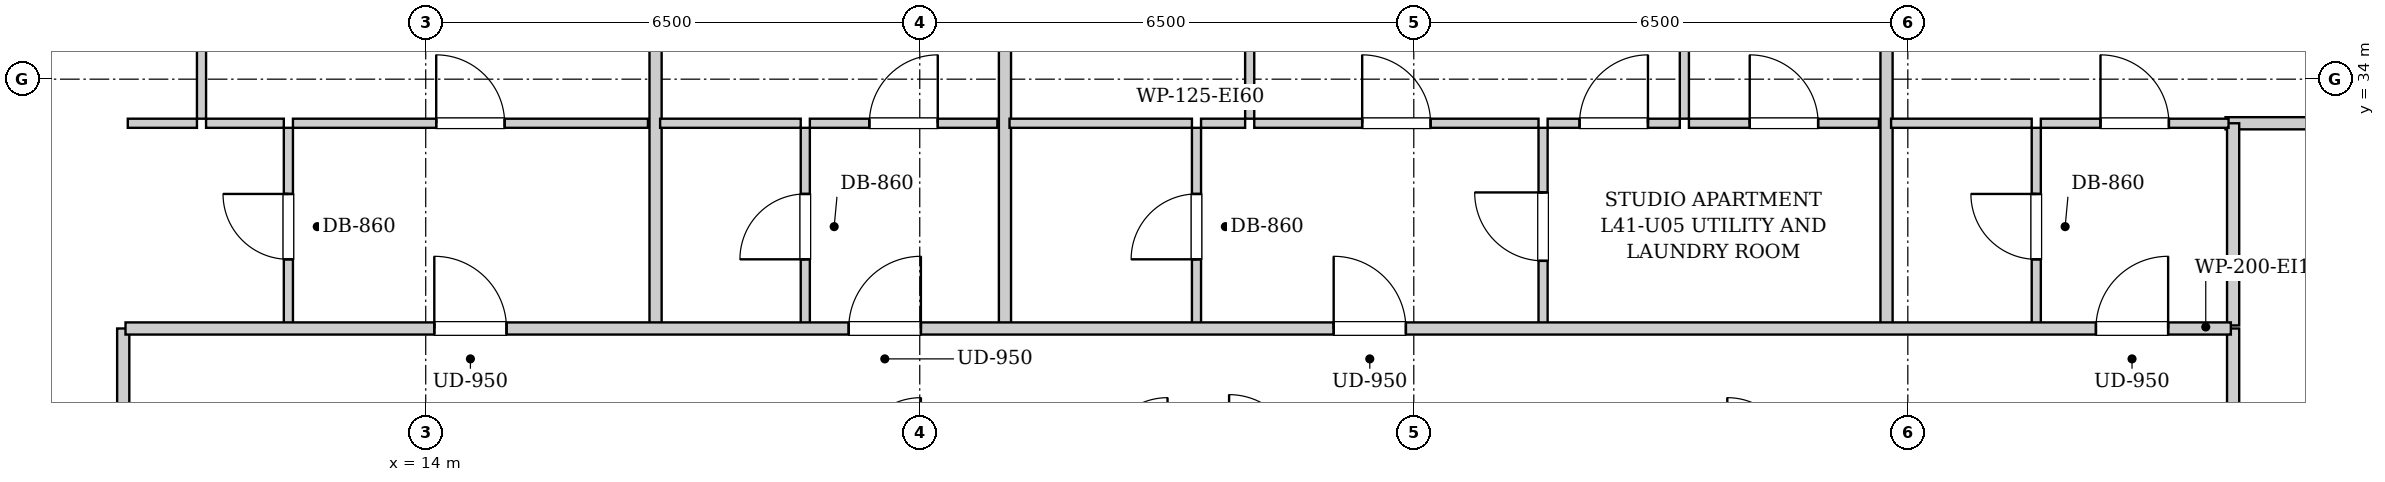
"""IFC4 building model, lengths in metres.
Left out: names, types, materials, properties, quantities, classifications, styles, units other than length and angle.
Written with IfcOpenShell. Run it as: python <this file> out.ifc"""

import sys

from ifc_helpers import new_model, si_unit, direction, frame, frame_2d, origin, place, context, subcontext, project, spatial, rectangle, extrude, element, fill, save


model = new_model("IFC4")
c1 = context("Model", 3, precision=1e-05, world=origin(), true_north=direction((0.0, 1.0)))
c2 = subcontext(c1, "Body", "Model", "MODEL_VIEW")
j1 = project(units=[si_unit("LENGTHUNIT", "METRE"), si_unit("PLANEANGLEUNIT", "RADIAN")], contexts=[c1])
p1 = place(None, origin())
s1 = spatial("IfcSite", under=j1, at=p1, CompositionType="ELEMENT")
p2 = place(p1, origin())
s2 = spatial("IfcBuilding", under=s1, at=p2, CompositionType="ELEMENT")
p3 = place(p2, frame((0.0, 0.0, 143.9)))
s3 = spatial("IfcBuildingStorey", under=s2, at=p3, CompositionType="ELEMENT", Elevation=143.9)
for number, where, z_axis, x_axis in (
    (1, (10.02, 28.98, 0.0), (0.0, 0.0, 1.0), (0.0, 1.0, 0.0)),
    (2, (37.78, 28.98, 0.0), (0.0, 0.0, 1.0), (0.0, 1.0, 0.0)),
):
    element("IfcWall", number, at=place(p3, frame(where, z_axis=z_axis, x_axis=x_axis)), inside=s3, PredefinedType="PARTITIONING", context=c2, shape_type="SweptSolid", body=[
        extrude(rectangle(XDim=1.74, YDim=0.16, at=frame_2d((0.87, 0.0))), origin(), (0.0, 0.0, 1.0), 2.99),
    ])
p4 = place(p3, frame((12.193, 30.76, 0.0), z_axis=(0.0, 0.0, 1.0), x_axis=(0.0, 1.0, 0.0)))
e3 = element("IfcWall", 3, at=p4, inside=s3, PredefinedType="PARTITIONING", context=c2, shape_type="SweptSolid", body=[
    extrude(rectangle(XDim=2.6, YDim=0.12, at=frame_2d((1.3, 0.0))), origin(), (0.0, 0.0, 1.0), 2.99),
])
p5 = place(p4, frame((0.87, 0.0, 0.0)))
e4 = element("IfcOpeningElement", 4, at=p5, cuts=e3, PredefinedType="OPENING", context=c2, shape_type="SweptSolid", body=[
    extrude(rectangle(XDim=0.86, YDim=2.05, at=frame_2d((0.43, 1.025))), frame((0.0, 0.07, 0.0), z_axis=(0.0, -1.0, 0.0), x_axis=(1.0, 0.0, 0.0)), (0.0, 0.0, 1.0), 0.14),
])
p6 = place(p3, frame((10.08, 33.42, 0.0), z_axis=(0.0, 0.0, 1.0), x_axis=(1.0, 0.0, 0.0)))
e5 = element("IfcWall", 5, at=p6, inside=s3, PredefinedType="PARTITIONING", context=c2, shape_type="SweptSolid", body=[
    extrude(rectangle(XDim=0.91, YDim=0.12, at=frame_2d((0.455, 0.0))), origin(), (0.0, 0.0, 1.0), 2.99),
])
p7 = place(p3, frame((11.11, 33.42, 0.0), z_axis=(0.0, 0.0, 1.0), x_axis=(1.0, 0.0, 0.0)))
e6 = element("IfcWall", 6, at=p7, inside=s3, PredefinedType="PARTITIONING", context=c2, shape_type="SweptSolid", body=[
    extrude(rectangle(XDim=1.023, YDim=0.12, at=frame_2d((0.511, 0.0))), origin(), (0.0, 0.0, 1.0), 2.99),
])
p8 = place(p3, frame((12.253, 33.42, 0.0), z_axis=(0.0, 0.0, 1.0), x_axis=(1.0, 0.0, 0.0)))
e7 = element("IfcWall", 7, at=p8, inside=s3, PredefinedType="PARTITIONING", context=c2, shape_type="SweptSolid", body=[
    extrude(rectangle(XDim=4.671, YDim=0.12, at=frame_2d((2.335, 0.0))), origin(), (0.0, 0.0, 1.0), 2.99),
])
p9 = place(p8, frame((1.885, 0.0, 0.0)))
e8 = element("IfcOpeningElement", 8, at=p9, cuts=e7, PredefinedType="OPENING", context=c2, shape_type="SweptSolid", body=[
    extrude(rectangle(XDim=0.9, YDim=2.05, at=frame_2d((0.45, 1.025))), frame((0.0, 0.07, 0.0), z_axis=(0.0, -1.0, 0.0), x_axis=(1.0, 0.0, 0.0)), (0.0, 0.0, 1.0), 0.14),
])
p10 = place(p3, frame((11.05, 33.48, 0.0), z_axis=(0.0, 0.0, 1.0), x_axis=(0.0, 1.0, 0.0)))
e9 = element("IfcWall", 9, at=p10, inside=s3, PredefinedType="PARTITIONING", context=c2, shape_type="SweptSolid", body=[
    extrude(rectangle(XDim=9.54, YDim=0.12, at=frame_2d((4.77, 0.0))), origin(), (0.0, 0.0, 1.0), 2.99),
])
p11 = place(p10, frame((4.305, 0.0, 0.0)))
e10 = element("IfcOpeningElement", 10, at=p11, cuts=e9, PredefinedType="OPENING", context=c2, shape_type="SweptSolid", body=[
    extrude(rectangle(XDim=0.9, YDim=2.05, at=frame_2d((0.45, 1.025))), frame((0.0, 0.07, 0.0), z_axis=(0.0, -1.0, 0.0), x_axis=(1.0, 0.0, 0.0)), (0.0, 0.0, 1.0), 0.14),
])
p12 = place(p3, frame((17.024, 30.76, 0.0), z_axis=(0.0, 0.0, 1.0), x_axis=(0.0, 1.0, 0.0)))
e11 = element("IfcWall", 11, at=p12, inside=s3, PredefinedType="PARTITIONING", context=c2, shape_type="SweptSolid", body=[
    extrude(rectangle(XDim=12.26, YDim=0.16, at=frame_2d((6.13, 0.0))), origin(), (0.0, 0.0, 1.0), 2.99),
])
p13 = place(p3, frame((18.994, 30.76, 0.0), z_axis=(0.0, 0.0, 1.0), x_axis=(0.0, 1.0, 0.0)))
e12 = element("IfcWall", 12, at=p13, inside=s3, PredefinedType="PARTITIONING", context=c2, shape_type="SweptSolid", body=[
    extrude(rectangle(XDim=2.6, YDim=0.12, at=frame_2d((1.3, 0.0))), origin(), (0.0, 0.0, 1.0), 2.99),
])
p14 = place(p13, frame((0.87, 0.0, 0.0)))
e13 = element("IfcOpeningElement", 13, at=p14, cuts=e12, PredefinedType="OPENING", context=c2, shape_type="SweptSolid", body=[
    extrude(rectangle(XDim=0.86, YDim=2.05, at=frame_2d((0.43, 1.025))), frame((0.0, 0.07, 0.0), z_axis=(0.0, -1.0, 0.0), x_axis=(1.0, 0.0, 0.0)), (0.0, 0.0, 1.0), 0.14),
])
p15 = place(p3, frame((17.084, 33.42, 0.0), z_axis=(0.0, 0.0, 1.0), x_axis=(1.0, 0.0, 0.0)))
e14 = element("IfcWall", 14, at=p15, inside=s3, PredefinedType="PARTITIONING", context=c2, shape_type="SweptSolid", body=[
    extrude(rectangle(XDim=1.85, YDim=0.12, at=frame_2d((0.925, 0.0))), origin(), (0.0, 0.0, 1.0), 2.99),
])
p16 = place(p3, frame((19.054, 33.42, 0.0), z_axis=(0.0, 0.0, 1.0), x_axis=(1.0, 0.0, 0.0)))
e15 = element("IfcWall", 15, at=p16, inside=s3, PredefinedType="PARTITIONING", context=c2, shape_type="SweptSolid", body=[
    extrude(rectangle(XDim=2.467, YDim=0.12, at=frame_2d((1.233, 0.0))), origin(), (0.0, 0.0, 1.0), 2.99),
])
p17 = place(p16, frame((0.783, 0.0, 0.0)))
e16 = element("IfcOpeningElement", 16, at=p17, cuts=e15, PredefinedType="OPENING", context=c2, shape_type="SweptSolid", body=[
    extrude(rectangle(XDim=0.9, YDim=2.05, at=frame_2d((0.45, 1.025))), frame((0.0, 0.07, 0.0), z_axis=(0.0, -1.0, 0.0), x_axis=(1.0, 0.0, 0.0)), (0.0, 0.0, 1.0), 0.14),
])
p18 = place(p3, frame((21.621, 30.76, 0.0), z_axis=(0.0, 0.0, 1.0), x_axis=(0.0, 1.0, 0.0)))
e17 = element("IfcWall", 17, at=p18, inside=s3, PredefinedType="PARTITIONING", context=c2, shape_type="SweptSolid", body=[
    extrude(rectangle(XDim=12.26, YDim=0.16, at=frame_2d((6.13, 0.0))), origin(), (0.0, 0.0, 1.0), 2.99),
])
p19 = place(p3, frame((24.141, 30.76, 0.0), z_axis=(0.0, 0.0, 1.0), x_axis=(0.0, 1.0, 0.0)))
e18 = element("IfcWall", 18, at=p19, inside=s3, PredefinedType="PARTITIONING", context=c2, shape_type="SweptSolid", body=[
    extrude(rectangle(XDim=2.6, YDim=0.12, at=frame_2d((1.3, 0.0))), origin(), (0.0, 0.0, 1.0), 2.99),
])
p20 = place(p19, frame((0.87, 0.0, 0.0)))
e19 = element("IfcOpeningElement", 19, at=p20, cuts=e18, PredefinedType="OPENING", context=c2, shape_type="SweptSolid", body=[
    extrude(rectangle(XDim=0.86, YDim=2.05, at=frame_2d((0.43, 1.025))), frame((0.0, 0.07, 0.0), z_axis=(0.0, -1.0, 0.0), x_axis=(1.0, 0.0, 0.0)), (0.0, 0.0, 1.0), 0.14),
])
p21 = place(p3, frame((21.681, 33.42, 0.0), z_axis=(0.0, 0.0, 1.0), x_axis=(1.0, 0.0, 0.0)))
e20 = element("IfcWall", 20, at=p21, inside=s3, PredefinedType="PARTITIONING", context=c2, shape_type="SweptSolid", body=[
    extrude(rectangle(XDim=2.4, YDim=0.12, at=frame_2d((1.2, 0.0))), origin(), (0.0, 0.0, 1.0), 2.99),
])
p22 = place(p3, frame((28.701, 30.76, 0.0), z_axis=(0.0, 0.0, 1.0), x_axis=(0.0, 1.0, 0.0)))
e21 = element("IfcWall", 21, at=p22, inside=s3, PredefinedType="PARTITIONING", context=c2, shape_type="SweptSolid", body=[
    extrude(rectangle(XDim=2.6, YDim=0.12, at=frame_2d((1.3, 0.0))), origin(), (0.0, 0.0, 1.0), 2.99),
])
p23 = place(p22, frame((0.85, 0.0, 0.0)))
e22 = element("IfcOpeningElement", 22, at=p23, cuts=e21, PredefinedType="OPENING", context=c2, shape_type="SweptSolid", body=[
    extrude(rectangle(XDim=0.9, YDim=2.05, at=frame_2d((0.45, 1.025))), frame((0.0, 0.07, 0.0), z_axis=(0.0, -1.0, 0.0), x_axis=(1.0, 0.0, 0.0)), (0.0, 0.0, 1.0), 0.14),
])
p24 = place(p3, frame((24.201, 33.42, 0.0), z_axis=(0.0, 0.0, 1.0), x_axis=(1.0, 0.0, 0.0)))
e23 = element("IfcWall", 23, at=p24, inside=s3, PredefinedType="PARTITIONING", context=c2, shape_type="SweptSolid", body=[
    extrude(rectangle(XDim=0.58, YDim=0.12, at=frame_2d((0.29, 0.0))), origin(), (0.0, 0.0, 1.0), 2.99),
])
p25 = place(p3, frame((24.901, 33.42, 0.0), z_axis=(0.0, 0.0, 1.0), x_axis=(1.0, 0.0, 0.0)))
e24 = element("IfcWall", 24, at=p25, inside=s3, PredefinedType="PARTITIONING", context=c2, shape_type="SweptSolid", body=[
    extrude(rectangle(XDim=3.74, YDim=0.12, at=frame_2d((1.87, 0.0))), origin(), (0.0, 0.0, 1.0), 2.99),
])
p26 = place(p25, frame((1.42, 0.0, 0.0)))
e25 = element("IfcOpeningElement", 25, at=p26, cuts=e24, PredefinedType="OPENING", context=c2, shape_type="SweptSolid", body=[
    extrude(rectangle(XDim=0.9, YDim=2.05, at=frame_2d((0.45, 1.025))), frame((0.0, 0.07, 0.0), z_axis=(0.0, -1.0, 0.0), x_axis=(1.0, 0.0, 0.0)), (0.0, 0.0, 1.0), 0.14),
])
p27 = place(p3, frame((28.761, 33.42, 0.0), z_axis=(0.0, 0.0, 1.0), x_axis=(1.0, 0.0, 0.0)))
e26 = element("IfcWall", 26, at=p27, inside=s3, PredefinedType="PARTITIONING", context=c2, shape_type="SweptSolid", body=[
    extrude(rectangle(XDim=1.739, YDim=0.12, at=frame_2d((0.87, 0.0))), origin(), (0.0, 0.0, 1.0), 2.99),
])
p28 = place(p27, frame((0.42, 0.0, 0.0)))
e27 = element("IfcOpeningElement", 27, at=p28, cuts=e26, PredefinedType="OPENING", context=c2, shape_type="SweptSolid", body=[
    extrude(rectangle(XDim=0.9, YDim=2.05, at=frame_2d((0.45, 1.025))), frame((0.0, 0.07, 0.0), z_axis=(0.0, -1.0, 0.0), x_axis=(1.0, 0.0, 0.0)), (0.0, 0.0, 1.0), 0.14),
])
p29 = place(p3, frame((30.62, 33.42, 0.0), z_axis=(0.0, 0.0, 1.0), x_axis=(1.0, 0.0, 0.0)))
e28 = element("IfcWall", 28, at=p29, inside=s3, PredefinedType="PARTITIONING", context=c2, shape_type="SweptSolid", body=[
    extrude(rectangle(XDim=2.5, YDim=0.12, at=frame_2d((1.25, 0.0))), origin(), (0.0, 0.0, 1.0), 2.99),
])
p30 = place(p29, frame((0.8, 0.0, 0.0)))
e29 = element("IfcOpeningElement", 29, at=p30, cuts=e28, PredefinedType="OPENING", context=c2, shape_type="SweptSolid", body=[
    extrude(rectangle(XDim=0.9, YDim=2.05, at=frame_2d((0.45, 1.025))), frame((0.0, 0.07, 0.0), z_axis=(0.0, -1.0, 0.0), x_axis=(1.0, 0.0, 0.0)), (0.0, 0.0, 1.0), 0.14),
])
p31 = place(p3, frame((24.841, 33.48, 0.0), z_axis=(0.0, 0.0, 1.0), x_axis=(0.0, 1.0, 0.0)))
e30 = element("IfcWall", 30, at=p31, inside=s3, PredefinedType="PARTITIONING", context=c2, shape_type="SweptSolid", body=[
    extrude(rectangle(XDim=9.54, YDim=0.12, at=frame_2d((4.77, 0.0))), origin(), (0.0, 0.0, 1.0), 2.99),
])
p32 = place(p31, frame((4.305, 0.0, 0.0)))
e31 = element("IfcOpeningElement", 31, at=p32, cuts=e30, PredefinedType="OPENING", context=c2, shape_type="SweptSolid", body=[
    extrude(rectangle(XDim=0.9, YDim=2.05, at=frame_2d((0.45, 1.025))), frame((0.0, 0.07, 0.0), z_axis=(0.0, -1.0, 0.0), x_axis=(1.0, 0.0, 0.0)), (0.0, 0.0, 1.0), 0.14),
])
p33 = place(p3, frame((30.56, 33.48, 0.0), z_axis=(0.0, 0.0, 1.0), x_axis=(0.0, 1.0, 0.0)))
e32 = element("IfcWall", 32, at=p33, inside=s3, PredefinedType="PARTITIONING", context=c2, shape_type="SweptSolid", body=[
    extrude(rectangle(XDim=7.39, YDim=0.12, at=frame_2d((3.695, 0.0))), origin(), (0.0, 0.0, 1.0), 2.99),
])
p34 = place(p33, frame((3.245, 0.0, 0.0)))
e33 = element("IfcOpeningElement", 33, at=p34, cuts=e32, PredefinedType="OPENING", context=c2, shape_type="SweptSolid", body=[
    extrude(rectangle(XDim=0.9, YDim=2.05, at=frame_2d((0.45, 1.025))), frame((0.0, 0.07, 0.0), z_axis=(0.0, -1.0, 0.0), x_axis=(1.0, 0.0, 0.0)), (0.0, 0.0, 1.0), 0.14),
])
p35 = place(p3, frame((37.68, 33.42, 0.0), z_axis=(0.0, 0.0, 1.0), x_axis=(1.0, 0.0, 0.0)))
e34 = element("IfcWall", 34, at=p35, inside=s3, PredefinedType="PARTITIONING", context=c2, shape_type="SweptSolid", body=[
    extrude(rectangle(XDim=2.34, YDim=0.16, at=frame_2d((1.17, 0.0))), origin(), (0.0, 0.0, 1.0), 2.99),
])
p36 = place(p3, frame((37.78, 30.76, 0.0), z_axis=(0.0, 0.0, 1.0), x_axis=(0.0, 1.0, 0.0)))
e35 = element("IfcWall", 35, at=p36, inside=s3, PredefinedType="PARTITIONING", context=c2, shape_type="SweptSolid", body=[
    extrude(rectangle(XDim=2.66, YDim=0.16, at=frame_2d((1.33, 0.0))), origin(), (0.0, 0.0, 1.0), 2.99),
])
p37 = place(p3, frame((33.22, 30.76, 0.0), z_axis=(0.0, 0.0, 1.0), x_axis=(0.0, 1.0, 0.0)))
e36 = element("IfcWall", 36, at=p37, inside=s3, PredefinedType="PARTITIONING", context=c2, shape_type="SweptSolid", body=[
    extrude(rectangle(XDim=10.28, YDim=0.16, at=frame_2d((5.14, 0.0))), origin(), (0.0, 0.0, 1.0), 2.426),
])
p38 = place(p3, frame((35.19, 30.76, 0.0), z_axis=(0.0, 0.0, 1.0), x_axis=(0.0, 1.0, 0.0)))
e37 = element("IfcWall", 37, at=p38, inside=s3, PredefinedType="PARTITIONING", context=c2, shape_type="SweptSolid", body=[
    extrude(rectangle(XDim=2.6, YDim=0.12, at=frame_2d((1.3, 0.0))), origin(), (0.0, 0.0, 1.0), 2.99),
])
p39 = place(p38, frame((0.87, 0.0, 0.0)))
e38 = element("IfcOpeningElement", 38, at=p39, cuts=e37, PredefinedType="OPENING", context=c2, shape_type="SweptSolid", body=[
    extrude(rectangle(XDim=0.86, YDim=2.05, at=frame_2d((0.43, 1.025))), frame((0.0, 0.07, 0.0), z_axis=(0.0, -1.0, 0.0), x_axis=(1.0, 0.0, 0.0)), (0.0, 0.0, 1.0), 0.14),
])
p40 = place(p3, frame((33.28, 33.42, 0.0), z_axis=(0.0, 0.0, 1.0), x_axis=(1.0, 0.0, 0.0)))
e39 = element("IfcWall", 39, at=p40, inside=s3, PredefinedType="PARTITIONING", context=c2, shape_type="SweptSolid", body=[
    extrude(rectangle(XDim=1.85, YDim=0.12, at=frame_2d((0.925, 0.0))), origin(), (0.0, 0.0, 1.0), 2.99),
])
p41 = place(p3, frame((35.25, 33.42, 0.0), z_axis=(0.0, 0.0, 1.0), x_axis=(1.0, 0.0, 0.0)))
e40 = element("IfcWall", 40, at=p41, inside=s3, PredefinedType="PARTITIONING", context=c2, shape_type="SweptSolid", body=[
    extrude(rectangle(XDim=2.47, YDim=0.12, at=frame_2d((1.235, 0.0))), origin(), (0.0, 0.0, 1.0), 2.99),
])
p42 = place(p41, frame((0.785, 0.0, 0.0)))
e41 = element("IfcOpeningElement", 41, at=p42, cuts=e40, PredefinedType="OPENING", context=c2, shape_type="SweptSolid", body=[
    extrude(rectangle(XDim=0.9, YDim=2.05, at=frame_2d((0.45, 1.025))), frame((0.0, 0.07, 0.0), z_axis=(0.0, -1.0, 0.0), x_axis=(1.0, 0.0, 0.0)), (0.0, 0.0, 1.0), 0.14),
])
p43 = place(p3, frame((10.05, 30.72, 0.0), z_axis=(0.0, 0.0, 1.0), x_axis=(1.0, 0.0, 0.0)))
e42 = element("IfcWall", 42, at=p43, inside=s3, PredefinedType="PARTITIONING", context=c2, shape_type="SweptSolid", body=[
    extrude(rectangle(XDim=27.7, YDim=0.16, at=frame_2d((13.85, 0.0))), origin(), (0.0, 0.0, 1.0), 2.99),
])
p44 = place(p43, frame((4.063, 0.0, 0.0)))
e43 = element("IfcOpeningElement", 43, at=p44, cuts=e42, PredefinedType="OPENING", context=c2, shape_type="SweptSolid", body=[
    extrude(rectangle(XDim=0.95, YDim=2.1, at=frame_2d((0.475, 1.05))), frame((0.0, 0.09, 0.0), z_axis=(0.0, -1.0, 0.0), x_axis=(1.0, 0.0, 0.0)), (0.0, 0.0, 1.0), 0.18),
])
p45 = place(p43, frame((9.515, 0.0, 0.0)))
e44 = element("IfcOpeningElement", 44, at=p45, cuts=e42, PredefinedType="OPENING", context=c2, shape_type="SweptSolid", body=[
    extrude(rectangle(XDim=0.95, YDim=2.1, at=frame_2d((0.475, 1.05))), frame((0.0, 0.09, 0.0), z_axis=(0.0, -1.0, 0.0), x_axis=(1.0, 0.0, 0.0)), (0.0, 0.0, 1.0), 0.18),
])
p46 = place(p43, frame((15.896, 0.0, 0.0)))
e45 = element("IfcOpeningElement", 45, at=p46, cuts=e42, PredefinedType="OPENING", context=c2, shape_type="SweptSolid", body=[
    extrude(rectangle(XDim=0.95, YDim=2.1, at=frame_2d((0.475, 1.05))), frame((0.0, 0.09, 0.0), z_axis=(0.0, -1.0, 0.0), x_axis=(1.0, 0.0, 0.0)), (0.0, 0.0, 1.0), 0.18),
])
p47 = place(p43, frame((25.925, 0.0, 0.0)))
e46 = element("IfcOpeningElement", 46, at=p47, cuts=e42, PredefinedType="OPENING", context=c2, shape_type="SweptSolid", body=[
    extrude(rectangle(XDim=0.95, YDim=2.1, at=frame_2d((0.475, 1.05))), frame((0.0, 0.09, 0.0), z_axis=(0.0, -1.0, 0.0), x_axis=(1.0, 0.0, 0.0)), (0.0, 0.0, 1.0), 0.18),
])
p48 = place(p5, origin())
e47 = element("IfcDoor", 47, at=p48, inside=s3, OperationType="SINGLE_SWING_RIGHT", PredefinedType="DOOR", context=c2, shape_type="SweptSolid", body=[
    extrude(rectangle(XDim=0.86, YDim=2.05, at=frame_2d((0.43, 1.025))), frame((0.0, 0.025, 0.0), z_axis=(0.0, -1.0, 0.0), x_axis=(1.0, 0.0, 0.0)), (0.0, 0.0, 1.0), 0.05),
])
fill(e4, e47)
p49 = place(p9, origin())
e48 = element("IfcDoor", 48, at=p49, inside=s3, OperationType="SINGLE_SWING_LEFT", PredefinedType="DOOR", context=c2, shape_type="SweptSolid", body=[
    extrude(rectangle(XDim=0.9, YDim=2.05, at=frame_2d((0.45, 1.025))), frame((0.0, 0.025, 0.0), z_axis=(0.0, -1.0, 0.0), x_axis=(1.0, 0.0, 0.0)), (0.0, 0.0, 1.0), 0.05),
])
fill(e8, e48)
p50 = place(p14, origin())
e49 = element("IfcDoor", 49, at=p50, inside=s3, OperationType="SINGLE_SWING_LEFT", PredefinedType="DOOR", context=c2, shape_type="SweptSolid", body=[
    extrude(rectangle(XDim=0.86, YDim=2.05, at=frame_2d((0.43, 1.025))), frame((0.0, 0.025, 0.0), z_axis=(0.0, -1.0, 0.0), x_axis=(1.0, 0.0, 0.0)), (0.0, 0.0, 1.0), 0.05),
])
fill(e13, e49)
p51 = place(p17, origin())
e50 = element("IfcDoor", 50, at=p51, inside=s3, OperationType="SINGLE_SWING_RIGHT", PredefinedType="DOOR", context=c2, shape_type="SweptSolid", body=[
    extrude(rectangle(XDim=0.9, YDim=2.05, at=frame_2d((0.45, 1.025))), frame((0.0, 0.025, 0.0), z_axis=(0.0, -1.0, 0.0), x_axis=(1.0, 0.0, 0.0)), (0.0, 0.0, 1.0), 0.05),
])
fill(e16, e50)
p52 = place(p20, origin())
e51 = element("IfcDoor", 51, at=p52, inside=s3, OperationType="SINGLE_SWING_LEFT", PredefinedType="DOOR", context=c2, shape_type="SweptSolid", body=[
    extrude(rectangle(XDim=0.86, YDim=2.05, at=frame_2d((0.43, 1.025))), frame((0.0, 0.025, 0.0), z_axis=(0.0, -1.0, 0.0), x_axis=(1.0, 0.0, 0.0)), (0.0, 0.0, 1.0), 0.05),
])
fill(e19, e51)
p53 = place(p23, origin())
e52 = element("IfcDoor", 52, at=p53, inside=s3, OperationType="SINGLE_SWING_RIGHT", PredefinedType="DOOR", context=c2, shape_type="SweptSolid", body=[
    extrude(rectangle(XDim=0.9, YDim=2.05, at=frame_2d((0.45, 1.025))), frame((0.0, 0.025, 0.0), z_axis=(0.0, -1.0, 0.0), x_axis=(1.0, 0.0, 0.0)), (0.0, 0.0, 1.0), 0.05),
])
fill(e22, e52)
p54 = place(p26, origin())
e53 = element("IfcDoor", 53, at=p54, inside=s3, OperationType="SINGLE_SWING_LEFT", PredefinedType="DOOR", context=c2, shape_type="SweptSolid", body=[
    extrude(rectangle(XDim=0.9, YDim=2.05, at=frame_2d((0.45, 1.025))), frame((0.0, 0.025, 0.0), z_axis=(0.0, -1.0, 0.0), x_axis=(1.0, 0.0, 0.0)), (0.0, 0.0, 1.0), 0.05),
])
fill(e25, e53)
p55 = place(p28, origin())
e54 = element("IfcDoor", 54, at=p55, inside=s3, OperationType="SINGLE_SWING_RIGHT", PredefinedType="DOOR", context=c2, shape_type="SweptSolid", body=[
    extrude(rectangle(XDim=0.9, YDim=2.05, at=frame_2d((0.45, 1.025))), frame((0.0, 0.025, 0.0), z_axis=(0.0, -1.0, 0.0), x_axis=(1.0, 0.0, 0.0)), (0.0, 0.0, 1.0), 0.05),
])
fill(e27, e54)
p56 = place(p30, origin())
e55 = element("IfcDoor", 55, at=p56, inside=s3, OperationType="SINGLE_SWING_LEFT", PredefinedType="DOOR", context=c2, shape_type="SweptSolid", body=[
    extrude(rectangle(XDim=0.9, YDim=2.05, at=frame_2d((0.45, 1.025))), frame((0.0, 0.025, 0.0), z_axis=(0.0, -1.0, 0.0), x_axis=(1.0, 0.0, 0.0)), (0.0, 0.0, 1.0), 0.05),
])
fill(e29, e55)
p57 = place(p39, origin())
e56 = element("IfcDoor", 56, at=p57, inside=s3, OperationType="SINGLE_SWING_RIGHT", PredefinedType="DOOR", context=c2, shape_type="SweptSolid", body=[
    extrude(rectangle(XDim=0.86, YDim=2.05, at=frame_2d((0.43, 1.025))), frame((0.0, 0.025, 0.0), z_axis=(0.0, -1.0, 0.0), x_axis=(1.0, 0.0, 0.0)), (0.0, 0.0, 1.0), 0.05),
])
fill(e38, e56)
p58 = place(p42, origin())
e57 = element("IfcDoor", 57, at=p58, inside=s3, OperationType="SINGLE_SWING_LEFT", PredefinedType="DOOR", context=c2, shape_type="SweptSolid", body=[
    extrude(rectangle(XDim=0.9, YDim=2.05, at=frame_2d((0.45, 1.025))), frame((0.0, 0.025, 0.0), z_axis=(0.0, -1.0, 0.0), x_axis=(1.0, 0.0, 0.0)), (0.0, 0.0, 1.0), 0.05),
])
fill(e41, e57)
p59 = place(p44, origin())
e58 = element("IfcDoor", 58, at=p59, inside=s3, OperationType="SINGLE_SWING_LEFT", PredefinedType="DOOR", context=c2, shape_type="SweptSolid", body=[
    extrude(rectangle(XDim=0.95, YDim=2.1, at=frame_2d((0.475, 1.05))), frame((0.0, 0.025, 0.0), z_axis=(0.0, -1.0, 0.0), x_axis=(1.0, 0.0, 0.0)), (0.0, 0.0, 1.0), 0.05),
])
fill(e43, e58)
p60 = place(p45, origin())
e59 = element("IfcDoor", 59, at=p60, inside=s3, OperationType="SINGLE_SWING_RIGHT", PredefinedType="DOOR", context=c2, shape_type="SweptSolid", body=[
    extrude(rectangle(XDim=0.95, YDim=2.1, at=frame_2d((0.475, 1.05))), frame((0.0, 0.025, 0.0), z_axis=(0.0, -1.0, 0.0), x_axis=(1.0, 0.0, 0.0)), (0.0, 0.0, 1.0), 0.05),
])
fill(e44, e59)
p61 = place(p46, origin())
e60 = element("IfcDoor", 60, at=p61, inside=s3, OperationType="SINGLE_SWING_LEFT", PredefinedType="DOOR", context=c2, shape_type="SweptSolid", body=[
    extrude(rectangle(XDim=0.95, YDim=2.1, at=frame_2d((0.475, 1.05))), frame((0.0, 0.025, 0.0), z_axis=(0.0, -1.0, 0.0), x_axis=(1.0, 0.0, 0.0)), (0.0, 0.0, 1.0), 0.05),
])
fill(e45, e60)
p62 = place(p47, origin())
e61 = element("IfcDoor", 61, at=p62, inside=s3, OperationType="SINGLE_SWING_RIGHT", PredefinedType="DOOR", context=c2, shape_type="SweptSolid", body=[
    extrude(rectangle(XDim=0.95, YDim=2.1, at=frame_2d((0.475, 1.05))), frame((0.0, 0.025, 0.0), z_axis=(0.0, -1.0, 0.0), x_axis=(1.0, 0.0, 0.0)), (0.0, 0.0, 1.0), 0.05),
])
fill(e46, e61)
save(model, sys.argv[1])
